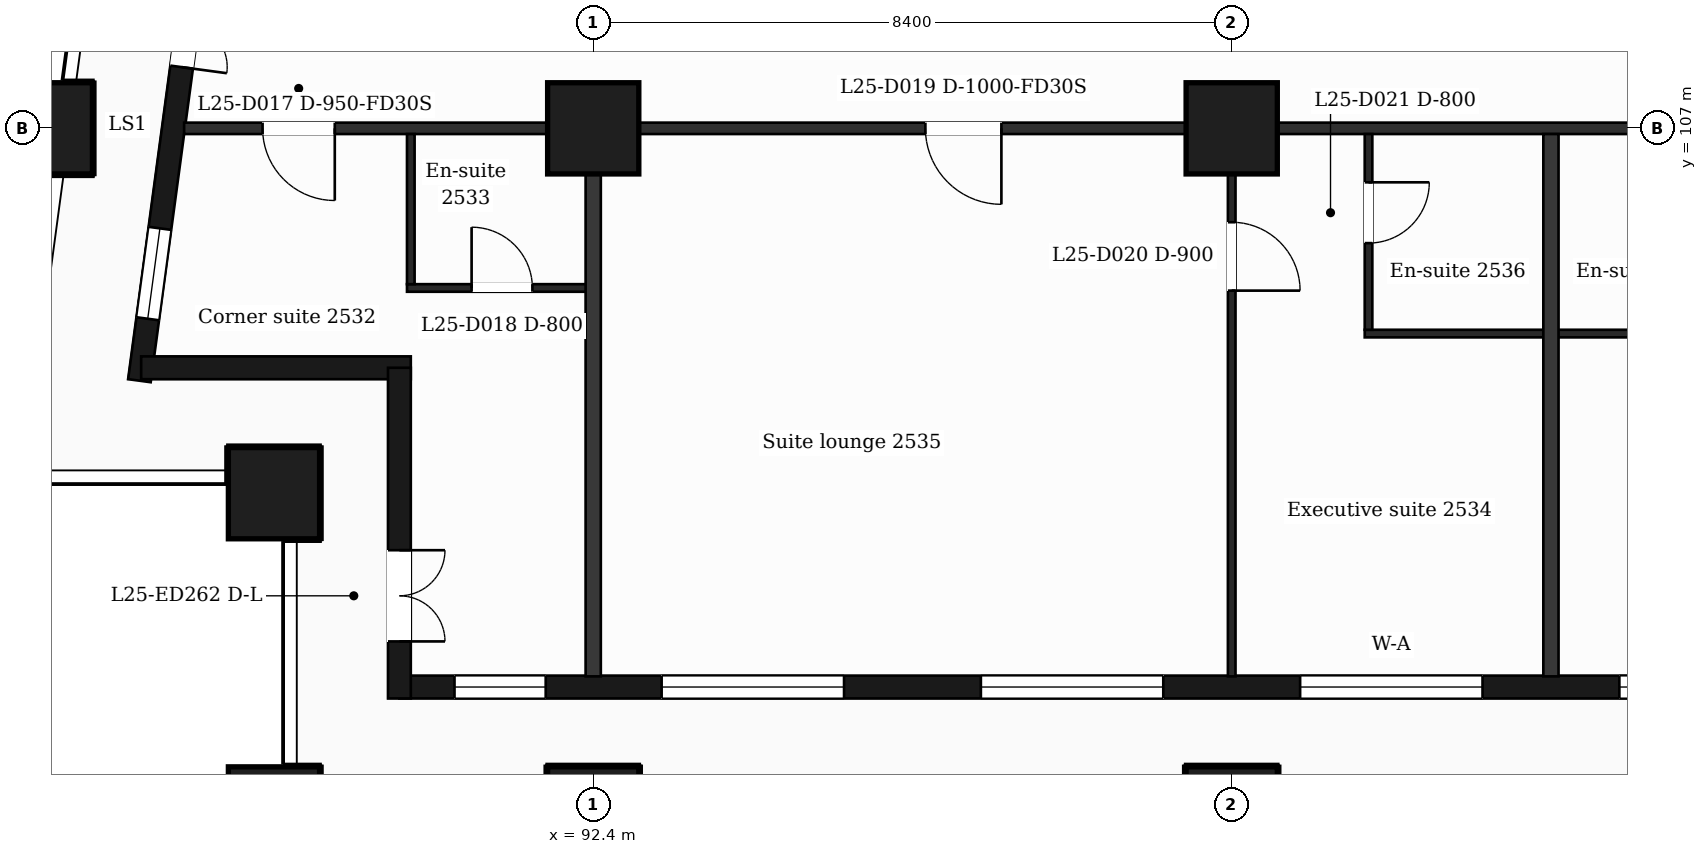
"""IFC4 building model, lengths in metres.
Left out: names, types, materials, properties, quantities, classifications, styles, units other than length and angle.
Written with IfcOpenShell. Run it as: python <this file> out.ifc"""

import sys

from ifc_helpers import new_model, si_unit, direction, frame, frame_2d, origin, origin_2d, place, context, subcontext, project, spatial, rectangle, extrude, element, fill, save


model = new_model("IFC4")
c1 = context("Model", 3, precision=1e-05, world=origin(), true_north=direction((0.0, 1.0)))
c2 = subcontext(c1, "Body", "Model", "MODEL_VIEW")
j1 = project(units=[si_unit("LENGTHUNIT", "METRE"), si_unit("PLANEANGLEUNIT", "RADIAN")], contexts=[c1])
p1 = place(None, origin())
s1 = spatial("IfcSite", under=j1, at=p1, CompositionType="ELEMENT")
p2 = place(p1, origin())
s2 = spatial("IfcBuilding", under=s1, at=p2, CompositionType="ELEMENT")
p3 = place(p2, frame((0.0, 0.0, 109.5)))
s3 = spatial("IfcBuildingStorey", under=s2, at=p3, CompositionType="ELEMENT", Elevation=109.5)
for number, where, z_axis, x_axis in (
    (1, (92.4, 98.0, 0.0), (0.0, 0.0, 1.0), (1.0, 0.0, 0.0)),
    (2, (100.8, 98.0, 0.0), (0.0, 0.0, 1.0), (1.0, 0.0, 0.0)),
    (3, (88.2, 98.0, 0.0), (0.0, 0.0, 1.0), (1.0, 0.0, 0.0)),
    (4, (88.2, 102.2, 0.0), (0.0, 0.0, 1.0), (1.0, 0.0, 0.0)),
    (5, (92.4, 107.0, 0.0), (0.0, 0.0, 1.0), (1.0, 0.0, 0.0)),
    (6, (100.8, 107.0, 0.0), (0.0, 0.0, 1.0), (1.0, 0.0, 0.0)),
    (7, (85.211, 107.0, 0.0), (0.0, 0.0, 1.0), (1.0, 0.0, 0.0)),
):
    element("IfcColumn", number, at=place(p3, frame(where, z_axis=z_axis, x_axis=x_axis)), inside=s3, PredefinedType="COLUMN", context=c2, shape_type="SweptSolid", body=[
        extrude(rectangle(XDim=1.2, YDim=1.2, at=origin_2d()), origin(), (0.0, 0.0, 1.0), 3.7),
    ])
p4 = place(p3, frame((89.85, 99.65, 0.0), z_axis=(0.0, 0.0, 1.0), x_axis=(1.0, 0.0, 0.0)))
e8 = element("IfcWall", 8, at=p4, inside=s3, PredefinedType="SOLIDWALL", context=c2, shape_type="SweptSolid", body=[
    extrude(rectangle(XDim=47.25, YDim=0.3, at=frame_2d((23.625, 0.0))), origin(), (0.0, 0.0, 1.0), 3.38),
])
p5 = place(p4, frame((0.725, 0.0, 0.9)))
e9 = element("IfcOpeningElement", 9, at=p5, cuts=e8, PredefinedType="OPENING", context=c2, shape_type="SweptSolid", body=[
    extrude(rectangle(XDim=1.2, YDim=2.1, at=frame_2d((0.6, 1.05))), frame((0.0, 0.16, 0.0), z_axis=(0.0, -1.0, 0.0), x_axis=(1.0, 0.0, 0.0)), (0.0, 0.0, 1.0), 0.32),
])
p6 = place(p4, frame((3.45, 0.0, 0.9)))
e10 = element("IfcOpeningElement", 10, at=p6, cuts=e8, PredefinedType="OPENING", context=c2, shape_type="SweptSolid", body=[
    extrude(rectangle(XDim=2.4, YDim=2.1, at=frame_2d((1.2, 1.05))), frame((0.0, 0.16, 0.0), z_axis=(0.0, -1.0, 0.0), x_axis=(1.0, 0.0, 0.0)), (0.0, 0.0, 1.0), 0.32),
])
p7 = place(p4, frame((7.65, 0.0, 0.9)))
e11 = element("IfcOpeningElement", 11, at=p7, cuts=e8, PredefinedType="OPENING", context=c2, shape_type="SweptSolid", body=[
    extrude(rectangle(XDim=2.4, YDim=2.1, at=frame_2d((1.2, 1.05))), frame((0.0, 0.16, 0.0), z_axis=(0.0, -1.0, 0.0), x_axis=(1.0, 0.0, 0.0)), (0.0, 0.0, 1.0), 0.32),
])
p8 = place(p4, frame((11.85, 0.0, 0.9)))
e12 = element("IfcOpeningElement", 12, at=p8, cuts=e8, PredefinedType="OPENING", context=c2, shape_type="SweptSolid", body=[
    extrude(rectangle(XDim=2.4, YDim=2.1, at=frame_2d((1.2, 1.05))), frame((0.0, 0.16, 0.0), z_axis=(0.0, -1.0, 0.0), x_axis=(1.0, 0.0, 0.0)), (0.0, 0.0, 1.0), 0.32),
])
p9 = place(p4, frame((16.05, 0.0, 0.9)))
e13 = element("IfcOpeningElement", 13, at=p9, cuts=e8, PredefinedType="OPENING", context=c2, shape_type="SweptSolid", body=[
    extrude(rectangle(XDim=2.4, YDim=2.1, at=frame_2d((1.2, 1.05))), frame((0.0, 0.16, 0.0), z_axis=(0.0, -1.0, 0.0), x_axis=(1.0, 0.0, 0.0)), (0.0, 0.0, 1.0), 0.32),
])
p10 = place(p4, frame((20.25, 0.0, 0.9)))
e14 = element("IfcOpeningElement", 14, at=p10, cuts=e8, PredefinedType="OPENING", context=c2, shape_type="SweptSolid", body=[
    extrude(rectangle(XDim=2.4, YDim=2.1, at=frame_2d((1.2, 1.05))), frame((0.0, 0.16, 0.0), z_axis=(0.0, -1.0, 0.0), x_axis=(1.0, 0.0, 0.0)), (0.0, 0.0, 1.0), 0.32),
])
p11 = place(p4, frame((25.05, 0.0, 0.9)))
e15 = element("IfcOpeningElement", 15, at=p11, cuts=e8, PredefinedType="OPENING", context=c2, shape_type="SweptSolid", body=[
    extrude(rectangle(XDim=1.2, YDim=2.1, at=frame_2d((0.6, 1.05))), frame((0.0, 0.16, 0.0), z_axis=(0.0, -1.0, 0.0), x_axis=(1.0, 0.0, 0.0)), (0.0, 0.0, 1.0), 0.32),
])
p12 = place(p4, frame((29.25, 0.0, 0.9)))
e16 = element("IfcOpeningElement", 16, at=p12, cuts=e8, PredefinedType="OPENING", context=c2, shape_type="SweptSolid", body=[
    extrude(rectangle(XDim=1.2, YDim=2.1, at=frame_2d((0.6, 1.05))), frame((0.0, 0.16, 0.0), z_axis=(0.0, -1.0, 0.0), x_axis=(1.0, 0.0, 0.0)), (0.0, 0.0, 1.0), 0.32),
])
p13 = place(p4, frame((32.55, 0.0, 0.0)))
e17 = element("IfcOpeningElement", 17, at=p13, cuts=e8, PredefinedType="OPENING", context=c2, shape_type="SweptSolid", body=[
    extrude(rectangle(XDim=1.2, YDim=2.4, at=frame_2d((0.6, 1.2))), frame((0.0, 0.16, 0.0), z_axis=(0.0, -1.0, 0.0), x_axis=(1.0, 0.0, 0.0)), (0.0, 0.0, 1.0), 0.32),
])
p14 = place(p4, frame((34.35, 0.0, 0.9)))
e18 = element("IfcOpeningElement", 18, at=p14, cuts=e8, PredefinedType="OPENING", context=c2, shape_type="SweptSolid", body=[
    extrude(rectangle(XDim=1.2, YDim=2.1, at=frame_2d((0.6, 1.05))), frame((0.0, 0.16, 0.0), z_axis=(0.0, -1.0, 0.0), x_axis=(1.0, 0.0, 0.0)), (0.0, 0.0, 1.0), 0.32),
])
p15 = place(p4, frame((37.05, 0.0, 0.9)))
e19 = element("IfcOpeningElement", 19, at=p15, cuts=e8, PredefinedType="OPENING", context=c2, shape_type="SweptSolid", body=[
    extrude(rectangle(XDim=2.4, YDim=2.1, at=frame_2d((1.2, 1.05))), frame((0.0, 0.16, 0.0), z_axis=(0.0, -1.0, 0.0), x_axis=(1.0, 0.0, 0.0)), (0.0, 0.0, 1.0), 0.32),
])
p16 = place(p4, frame((40.95, 0.0, 0.0)))
e20 = element("IfcOpeningElement", 20, at=p16, cuts=e8, PredefinedType="OPENING", context=c2, shape_type="SweptSolid", body=[
    extrude(rectangle(XDim=1.2, YDim=2.4, at=frame_2d((0.6, 1.2))), frame((0.0, 0.16, 0.0), z_axis=(0.0, -1.0, 0.0), x_axis=(1.0, 0.0, 0.0)), (0.0, 0.0, 1.0), 0.32),
])
p17 = place(p4, frame((42.75, 0.0, 0.9)))
e21 = element("IfcOpeningElement", 21, at=p17, cuts=e8, PredefinedType="OPENING", context=c2, shape_type="SweptSolid", body=[
    extrude(rectangle(XDim=1.2, YDim=2.1, at=frame_2d((0.6, 1.05))), frame((0.0, 0.16, 0.0), z_axis=(0.0, -1.0, 0.0), x_axis=(1.0, 0.0, 0.0)), (0.0, 0.0, 1.0), 0.32),
])
p18 = place(p4, frame((45.25, 0.0, 0.9)))
e22 = element("IfcOpeningElement", 22, at=p18, cuts=e8, PredefinedType="OPENING", context=c2, shape_type="SweptSolid", body=[
    extrude(rectangle(XDim=1.2, YDim=2.1, at=frame_2d((0.6, 1.05))), frame((0.0, 0.16, 0.0), z_axis=(0.0, -1.0, 0.0), x_axis=(1.0, 0.0, 0.0)), (0.0, 0.0, 1.0), 0.32),
])
p19 = place(p3, frame((87.334, 110.4, 0.0), z_axis=(0.0, 0.0, 1.0), x_axis=(-0.133437175554, -0.991057273915, 0.0)))
e23 = element("IfcWall", 23, at=p19, inside=s3, PredefinedType="SOLIDWALL", context=c2, shape_type="SweptSolid", body=[
    extrude(rectangle(XDim=6.781, YDim=0.3, at=frame_2d((3.39, 0.0))), origin(), (0.0, 0.0, 1.0), 3.38),
])
p20 = place(p19, frame((1.418, 0.0, 0.0)))
e24 = element("IfcOpeningElement", 24, at=p20, cuts=e23, PredefinedType="OPENING", context=c2, shape_type="SweptSolid", body=[
    extrude(rectangle(XDim=1.2, YDim=2.4, at=frame_2d((0.6, 1.2))), frame((0.0, 0.16, 0.0), z_axis=(0.0, -1.0, 0.0), x_axis=(1.0, 0.0, 0.0)), (0.0, 0.0, 1.0), 0.32),
])
p21 = place(p19, frame((4.758, 0.0, 0.9)))
e25 = element("IfcOpeningElement", 25, at=p21, cuts=e23, PredefinedType="OPENING", context=c2, shape_type="SweptSolid", body=[
    extrude(rectangle(XDim=1.2, YDim=2.1, at=frame_2d((0.6, 1.05))), frame((0.0, 0.16, 0.0), z_axis=(0.0, -1.0, 0.0), x_axis=(1.0, 0.0, 0.0)), (0.0, 0.0, 1.0), 0.32),
])
p22 = place(p3, frame((86.452, 103.85, 0.0), z_axis=(0.0, 0.0, 1.0), x_axis=(1.0, 0.0, 0.0)))
e26 = element("IfcWall", 26, at=p22, inside=s3, PredefinedType="SOLIDWALL", context=c2, shape_type="SweptSolid", body=[
    extrude(rectangle(XDim=3.548, YDim=0.3, at=frame_2d((1.774, 0.0))), origin(), (0.0, 0.0, 1.0), 3.38),
])
p23 = place(p3, frame((89.85, 103.85, 0.0), z_axis=(0.0, 0.0, 1.0), x_axis=(0.0, -1.0, 0.0)))
e27 = element("IfcWall", 27, at=p23, inside=s3, PredefinedType="SOLIDWALL", context=c2, shape_type="SweptSolid", body=[
    extrude(rectangle(XDim=4.35, YDim=0.3, at=frame_2d((2.175, 0.0))), origin(), (0.0, 0.0, 1.0), 3.38),
])
p24 = place(p23, frame((2.4, 0.0, 0.0)))
e28 = element("IfcOpeningElement", 28, at=p24, cuts=e27, PredefinedType="OPENING", context=c2, shape_type="SweptSolid", body=[
    extrude(rectangle(XDim=1.2, YDim=2.4, at=frame_2d((0.6, 1.2))), frame((0.0, 0.16, 0.0), z_axis=(0.0, -1.0, 0.0), x_axis=(1.0, 0.0, 0.0)), (0.0, 0.0, 1.0), 0.32),
])
p25 = place(p3, frame((102.55, 104.3, 0.0), z_axis=(0.0, 0.0, 1.0), x_axis=(1.0, 0.0, 0.0)))
e29 = element("IfcWall", 29, at=p25, inside=s3, PredefinedType="PARTITIONING", context=c2, shape_type="SweptSolid", body=[
    extrude(rectangle(XDim=4.9, YDim=0.1, at=frame_2d((2.45, 0.0))), origin(), (0.0, 0.0, 1.0), 3.38),
])
p26 = place(p3, frame((89.95, 104.9, 0.0), z_axis=(0.0, 0.0, 1.0), x_axis=(1.0, 0.0, 0.0)))
e30 = element("IfcWall", 30, at=p26, inside=s3, PredefinedType="PARTITIONING", context=c2, shape_type="SweptSolid", body=[
    extrude(rectangle(XDim=2.45, YDim=0.1, at=frame_2d((1.225, 0.0))), origin(), (0.0, 0.0, 1.0), 3.38),
])
p27 = place(p26, frame((0.85, 0.0, 0.0)))
e31 = element("IfcOpeningElement", 31, at=p27, cuts=e30, PredefinedType="OPENING", context=c2, shape_type="SweptSolid", body=[
    extrude(rectangle(XDim=0.8, YDim=2.1, at=frame_2d((0.4, 1.05))), frame((0.0, 0.06, 0.0), z_axis=(0.0, -1.0, 0.0), x_axis=(1.0, 0.0, 0.0)), (0.0, 0.0, 1.0), 0.12),
])
p28 = place(p3, frame((87.018, 107.0, 0.0), z_axis=(0.0, 0.0, 1.0), x_axis=(1.0, 0.0, 0.0)))
e32 = element("IfcWall", 32, at=p28, inside=s3, PredefinedType="PARTITIONING", context=c2, shape_type="SweptSolid", body=[
    extrude(rectangle(XDim=52.765, YDim=0.15, at=frame_2d((26.382, 0.0))), origin(), (0.0, 0.0, 1.0), 3.38),
])
p29 = place(p28, frame((1.032, 0.0, 0.0)))
e33 = element("IfcOpeningElement", 33, at=p29, cuts=e32, PredefinedType="OPENING", context=c2, shape_type="SweptSolid", body=[
    extrude(rectangle(XDim=0.95, YDim=2.1, at=frame_2d((0.475, 1.05))), frame((0.0, 0.085, 0.0), z_axis=(0.0, -1.0, 0.0), x_axis=(1.0, 0.0, 0.0)), (0.0, 0.0, 1.0), 0.17),
])
p30 = place(p28, frame((9.752, 0.0, 0.0)))
e34 = element("IfcOpeningElement", 34, at=p30, cuts=e32, PredefinedType="OPENING", context=c2, shape_type="SweptSolid", body=[
    extrude(rectangle(XDim=1.0, YDim=2.1, at=frame_2d((0.5, 1.05))), frame((0.0, 0.085, 0.0), z_axis=(0.0, -1.0, 0.0), x_axis=(1.0, 0.0, 0.0)), (0.0, 0.0, 1.0), 0.17),
])
p31 = place(p28, frame((23.995, 0.0, 0.0)))
e35 = element("IfcOpeningElement", 35, at=p31, cuts=e32, PredefinedType="OPENING", context=c2, shape_type="SweptSolid", body=[
    extrude(rectangle(XDim=0.95, YDim=2.1, at=frame_2d((0.475, 1.05))), frame((0.0, 0.085, 0.0), z_axis=(0.0, -1.0, 0.0), x_axis=(1.0, 0.0, 0.0)), (0.0, 0.0, 1.0), 0.17),
])
p32 = place(p28, frame((28.645, 0.0, 0.0)))
e36 = element("IfcOpeningElement", 36, at=p32, cuts=e32, PredefinedType="OPENING", context=c2, shape_type="SweptSolid", body=[
    extrude(rectangle(XDim=0.95, YDim=2.1, at=frame_2d((0.475, 1.05))), frame((0.0, 0.085, 0.0), z_axis=(0.0, -1.0, 0.0), x_axis=(1.0, 0.0, 0.0)), (0.0, 0.0, 1.0), 0.17),
])
p33 = place(p28, frame((36.632, 0.0, 0.0)))
e37 = element("IfcOpeningElement", 37, at=p33, cuts=e32, PredefinedType="OPENING", context=c2, shape_type="SweptSolid", body=[
    extrude(rectangle(XDim=1.0, YDim=2.1, at=frame_2d((0.5, 1.05))), frame((0.0, 0.085, 0.0), z_axis=(0.0, -1.0, 0.0), x_axis=(1.0, 0.0, 0.0)), (0.0, 0.0, 1.0), 0.17),
])
p34 = place(p28, frame((41.957, 0.0, 0.0)))
e38 = element("IfcOpeningElement", 38, at=p34, cuts=e32, PredefinedType="OPENING", context=c2, shape_type="SweptSolid", body=[
    extrude(rectangle(XDim=0.95, YDim=2.1, at=frame_2d((0.475, 1.05))), frame((0.0, 0.085, 0.0), z_axis=(0.0, -1.0, 0.0), x_axis=(1.0, 0.0, 0.0)), (0.0, 0.0, 1.0), 0.17),
])
p35 = place(p28, frame((45.607, 0.0, 0.0)))
e39 = element("IfcOpeningElement", 39, at=p35, cuts=e32, PredefinedType="OPENING", context=c2, shape_type="SweptSolid", body=[
    extrude(rectangle(XDim=0.95, YDim=2.1, at=frame_2d((0.475, 1.05))), frame((0.0, 0.085, 0.0), z_axis=(0.0, -1.0, 0.0), x_axis=(1.0, 0.0, 0.0)), (0.0, 0.0, 1.0), 0.17),
])
p36 = place(p28, frame((48.767, 0.0, 0.0)))
e40 = element("IfcOpeningElement", 40, at=p36, cuts=e32, PredefinedType="OPENING", context=c2, shape_type="SweptSolid", body=[
    extrude(rectangle(XDim=0.95, YDim=2.1, at=frame_2d((0.475, 1.05))), frame((0.0, 0.085, 0.0), z_axis=(0.0, -1.0, 0.0), x_axis=(1.0, 0.0, 0.0)), (0.0, 0.0, 1.0), 0.17),
])
p37 = place(p3, frame((90.0, 104.95, 0.0), z_axis=(0.0, 0.0, 1.0), x_axis=(0.0, 1.0, 0.0)))
e41 = element("IfcWall", 41, at=p37, inside=s3, PredefinedType="PARTITIONING", context=c2, shape_type="SweptSolid", body=[
    extrude(rectangle(XDim=1.975, YDim=0.1, at=frame_2d((0.988, 0.0))), origin(), (0.0, 0.0, 1.0), 3.38),
])
p38 = place(p3, frame((92.4, 99.79, 0.0), z_axis=(0.0, 0.0, 1.0), x_axis=(0.0, 1.0, 0.0)))
e42 = element("IfcWall", 42, at=p38, inside=s3, PredefinedType="PARTITIONING", context=c2, shape_type="SweptSolid", body=[
    extrude(rectangle(XDim=7.135, YDim=0.2, at=frame_2d((3.567, 0.0))), origin(), (0.0, 0.0, 1.0), 3.38),
])
p39 = place(p3, frame((100.8, 99.79, 0.0), z_axis=(0.0, 0.0, 1.0), x_axis=(0.0, 1.0, 0.0)))
e43 = element("IfcWall", 43, at=p39, inside=s3, PredefinedType="PARTITIONING", context=c2, shape_type="SweptSolid", body=[
    extrude(rectangle(XDim=7.135, YDim=0.1, at=frame_2d((3.567, 0.0))), origin(), (0.0, 0.0, 1.0), 3.38),
])
p40 = place(p39, frame((5.075, 0.0, 0.0)))
e44 = element("IfcOpeningElement", 44, at=p40, cuts=e43, PredefinedType="OPENING", context=c2, shape_type="SweptSolid", body=[
    extrude(rectangle(XDim=0.9, YDim=2.1, at=frame_2d((0.45, 1.05))), frame((0.0, 0.06, 0.0), z_axis=(0.0, -1.0, 0.0), x_axis=(1.0, 0.0, 0.0)), (0.0, 0.0, 1.0), 0.12),
])
p41 = place(p3, frame((102.6, 104.35, 0.0), z_axis=(0.0, 0.0, 1.0), x_axis=(0.0, 1.0, 0.0)))
e45 = element("IfcWall", 45, at=p41, inside=s3, PredefinedType="PARTITIONING", context=c2, shape_type="SweptSolid", body=[
    extrude(rectangle(XDim=2.575, YDim=0.1, at=frame_2d((1.288, 0.0))), origin(), (0.0, 0.0, 1.0), 3.38),
])
p42 = place(p41, frame((1.14, 0.0, 0.0)))
e46 = element("IfcOpeningElement", 46, at=p42, cuts=e45, PredefinedType="OPENING", context=c2, shape_type="SweptSolid", body=[
    extrude(rectangle(XDim=0.8, YDim=2.1, at=frame_2d((0.4, 1.05))), frame((0.0, 0.06, 0.0), z_axis=(0.0, -1.0, 0.0), x_axis=(1.0, 0.0, 0.0)), (0.0, 0.0, 1.0), 0.12),
])
p43 = place(p3, frame((105.0, 99.79, 0.0), z_axis=(0.0, 0.0, 1.0), x_axis=(0.0, 1.0, 0.0)))
e47 = element("IfcWall", 47, at=p43, inside=s3, PredefinedType="PARTITIONING", context=c2, shape_type="SweptSolid", body=[
    extrude(rectangle(XDim=7.135, YDim=0.2, at=frame_2d((3.567, 0.0))), origin(), (0.0, 0.0, 1.0), 3.38),
])
p44 = place(p5, origin())
e48 = element("IfcWindow", 48, at=p44, inside=s3, PartitioningType="SINGLE_PANEL", PredefinedType="WINDOW", context=c2, shape_type="SweptSolid", body=[
    extrude(rectangle(XDim=1.2, YDim=2.1, at=frame_2d((0.6, 1.05))), frame((0.0, 0.03, 0.0), z_axis=(0.0, -1.0, 0.0), x_axis=(1.0, 0.0, 0.0)), (0.0, 0.0, 1.0), 0.06),
])
fill(e9, e48)
p45 = place(p6, origin())
e49 = element("IfcWindow", 49, at=p45, inside=s3, PartitioningType="SINGLE_PANEL", PredefinedType="WINDOW", context=c2, shape_type="SweptSolid", body=[
    extrude(rectangle(XDim=2.4, YDim=2.1, at=frame_2d((1.2, 1.05))), frame((0.0, 0.03, 0.0), z_axis=(0.0, -1.0, 0.0), x_axis=(1.0, 0.0, 0.0)), (0.0, 0.0, 1.0), 0.06),
])
fill(e10, e49)
p46 = place(p7, origin())
e50 = element("IfcWindow", 50, at=p46, inside=s3, PartitioningType="SINGLE_PANEL", PredefinedType="WINDOW", context=c2, shape_type="SweptSolid", body=[
    extrude(rectangle(XDim=2.4, YDim=2.1, at=frame_2d((1.2, 1.05))), frame((0.0, 0.03, 0.0), z_axis=(0.0, -1.0, 0.0), x_axis=(1.0, 0.0, 0.0)), (0.0, 0.0, 1.0), 0.06),
])
fill(e11, e50)
p47 = place(p8, origin())
e51 = element("IfcWindow", 51, at=p47, inside=s3, PartitioningType="SINGLE_PANEL", PredefinedType="WINDOW", context=c2, shape_type="SweptSolid", body=[
    extrude(rectangle(XDim=2.4, YDim=2.1, at=frame_2d((1.2, 1.05))), frame((0.0, 0.03, 0.0), z_axis=(0.0, -1.0, 0.0), x_axis=(1.0, 0.0, 0.0)), (0.0, 0.0, 1.0), 0.06),
])
fill(e12, e51)
p48 = place(p9, origin())
e52 = element("IfcWindow", 52, at=p48, inside=s3, PartitioningType="SINGLE_PANEL", PredefinedType="WINDOW", context=c2, shape_type="SweptSolid", body=[
    extrude(rectangle(XDim=2.4, YDim=2.1, at=frame_2d((1.2, 1.05))), frame((0.0, 0.03, 0.0), z_axis=(0.0, -1.0, 0.0), x_axis=(1.0, 0.0, 0.0)), (0.0, 0.0, 1.0), 0.06),
])
fill(e13, e52)
p49 = place(p20, origin())
e53 = element("IfcDoor", 53, at=p49, inside=s3, OperationType="DOUBLE_DOOR_SINGLE_SWING", PredefinedType="DOOR", context=c2, shape_type="SweptSolid", body=[
    extrude(rectangle(XDim=1.2, YDim=2.4, at=frame_2d((0.6, 1.2))), frame((0.0, 0.025, 0.0), z_axis=(0.0, -1.0, 0.0), x_axis=(1.0, 0.0, 0.0)), (0.0, 0.0, 1.0), 0.05),
])
fill(e24, e53)
p50 = place(p21, origin())
e54 = element("IfcWindow", 54, at=p50, inside=s3, PartitioningType="SINGLE_PANEL", PredefinedType="WINDOW", context=c2, shape_type="SweptSolid", body=[
    extrude(rectangle(XDim=1.2, YDim=2.1, at=frame_2d((0.6, 1.05))), frame((0.0, 0.03, 0.0), z_axis=(0.0, -1.0, 0.0), x_axis=(1.0, 0.0, 0.0)), (0.0, 0.0, 1.0), 0.06),
])
fill(e25, e54)
p51 = place(p24, origin())
e55 = element("IfcDoor", 55, at=p51, inside=s3, OperationType="DOUBLE_DOOR_SINGLE_SWING", PredefinedType="DOOR", context=c2, shape_type="SweptSolid", body=[
    extrude(rectangle(XDim=1.2, YDim=2.4, at=frame_2d((0.6, 1.2))), frame((0.0, 0.025, 0.0), z_axis=(0.0, -1.0, 0.0), x_axis=(1.0, 0.0, 0.0)), (0.0, 0.0, 1.0), 0.05),
])
fill(e28, e55)
p52 = place(p29, origin())
e56 = element("IfcDoor", 56, at=p52, inside=s3, OperationType="SINGLE_SWING_RIGHT", PredefinedType="DOOR", context=c2, shape_type="SweptSolid", body=[
    extrude(rectangle(XDim=0.95, YDim=2.1, at=frame_2d((0.475, 1.05))), frame((0.0, 0.025, 0.0), z_axis=(0.0, -1.0, 0.0), x_axis=(1.0, 0.0, 0.0)), (0.0, 0.0, 1.0), 0.05),
])
fill(e33, e56)
p53 = place(p27, origin())
e57 = element("IfcDoor", 57, at=p53, inside=s3, OperationType="SINGLE_SWING_LEFT", PredefinedType="DOOR", context=c2, shape_type="SweptSolid", body=[
    extrude(rectangle(XDim=0.8, YDim=2.1, at=frame_2d((0.4, 1.05))), frame((0.0, 0.025, 0.0), z_axis=(0.0, -1.0, 0.0), x_axis=(1.0, 0.0, 0.0)), (0.0, 0.0, 1.0), 0.05),
])
fill(e31, e57)
p54 = place(p30, origin())
e58 = element("IfcDoor", 58, at=p54, inside=s3, OperationType="SINGLE_SWING_RIGHT", PredefinedType="DOOR", context=c2, shape_type="SweptSolid", body=[
    extrude(rectangle(XDim=1.0, YDim=2.1, at=frame_2d((0.5, 1.05))), frame((0.0, 0.025, 0.0), z_axis=(0.0, -1.0, 0.0), x_axis=(1.0, 0.0, 0.0)), (0.0, 0.0, 1.0), 0.05),
])
fill(e34, e58)
p55 = place(p40, origin())
e59 = element("IfcDoor", 59, at=p55, inside=s3, OperationType="SINGLE_SWING_LEFT", PredefinedType="DOOR", context=c2, shape_type="SweptSolid", body=[
    extrude(rectangle(XDim=0.9, YDim=2.1, at=frame_2d((0.45, 1.05))), frame((0.0, 0.025, 0.0), z_axis=(0.0, -1.0, 0.0), x_axis=(1.0, 0.0, 0.0)), (0.0, 0.0, 1.0), 0.05),
])
fill(e44, e59)
p56 = place(p42, origin())
e60 = element("IfcDoor", 60, at=p56, inside=s3, OperationType="SINGLE_SWING_RIGHT", PredefinedType="DOOR", context=c2, shape_type="SweptSolid", body=[
    extrude(rectangle(XDim=0.8, YDim=2.1, at=frame_2d((0.4, 1.05))), frame((0.0, 0.025, 0.0), z_axis=(0.0, -1.0, 0.0), x_axis=(1.0, 0.0, 0.0)), (0.0, 0.0, 1.0), 0.05),
])
fill(e46, e60)
save(model, sys.argv[1])
